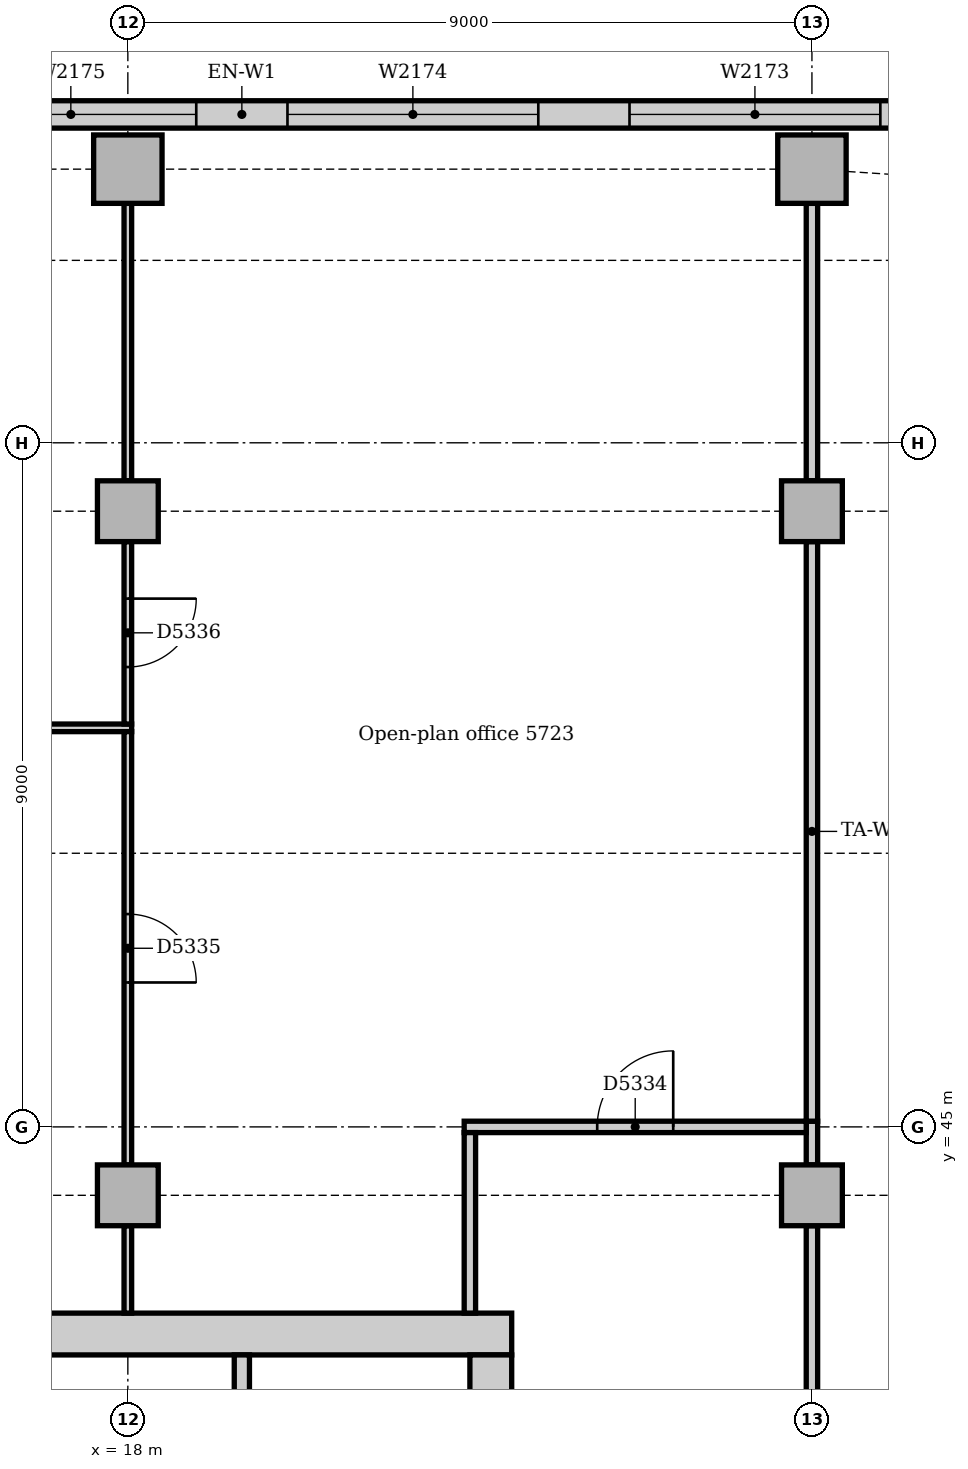
"""IFC4 building model, lengths in metres.
Left out: names, types, materials, properties, quantities, classifications, styles, units other than length and angle.
Written with IfcOpenShell. Run it as: python <this file> out.ifc"""

import sys

from ifc_helpers import new_model, si_unit, direction, frame, frame_2d, origin, origin_2d, place, context, subcontext, project, spatial, rectangle, extrude, element, fill, save


model = new_model("IFC4")
c1 = context("Model", 3, precision=1e-05, world=origin(), true_north=direction((0.0, 1.0)))
c2 = subcontext(c1, "Body", "Model", "MODEL_VIEW")
j1 = project(units=[si_unit("LENGTHUNIT", "METRE"), si_unit("PLANEANGLEUNIT", "RADIAN")], contexts=[c1])
p1 = place(None, origin())
s1 = spatial("IfcSite", under=j1, at=p1, CompositionType="ELEMENT")
p2 = place(p1, origin())
s2 = spatial("IfcBuilding", under=s1, at=p2, CompositionType="ELEMENT")
p3 = place(p2, frame((0.0, 0.0, 238.0)))
s3 = spatial("IfcBuildingStorey", under=s2, at=p3, CompositionType="ELEMENT", Elevation=238.0)
p4 = place(p3, frame((23.05, 42.275, 0.0), z_axis=(0.0, 0.0, 1.0), x_axis=(-1.0, 0.0, 0.0)))
e1 = element("IfcWall", 1, at=p4, inside=s3, PredefinedType="SOLIDWALL", context=c2, shape_type="SweptSolid", body=[
    extrude(rectangle(XDim=19.1, YDim=0.55, at=frame_2d((9.55, 0.0))), origin(), (0.0, 0.0, 1.0), 4.0),
])
p5 = place(p3, frame((22.775, 31.5, 0.0), z_axis=(0.0, 0.0, 1.0), x_axis=(0.0, 1.0, 0.0)))
e2 = element("IfcWall", 2, at=p5, inside=s3, PredefinedType="SOLIDWALL", context=c2, shape_type="SweptSolid", body=[
    extrude(rectangle(XDim=10.5, YDim=0.55, at=frame_2d((5.25, 0.0))), origin(), (0.0, 0.0, 1.0), 4.0),
])
p6 = place(p5, frame((3.15, 0.0, 0.0)))
e3 = element("IfcOpeningElement", 3, at=p6, cuts=e2, PredefinedType="OPENING", context=c2, shape_type="SweptSolid", body=[
    extrude(rectangle(XDim=1.0, YDim=2.1, at=frame_2d((0.5, 1.05))), frame((0.0, 0.285, 0.0), z_axis=(0.0, -1.0, 0.0), x_axis=(1.0, 0.0, 0.0)), (0.0, 0.0, 1.0), 0.57),
])
p7 = place(p5, frame((5.2, 0.0, 0.0)))
e4 = element("IfcOpeningElement", 4, at=p7, cuts=e2, PredefinedType="OPENING", context=c2, shape_type="SweptSolid", body=[
    extrude(rectangle(XDim=1.0, YDim=2.1, at=frame_2d((0.5, 1.05))), frame((0.0, 0.285, 0.0), z_axis=(0.0, -1.0, 0.0), x_axis=(1.0, 0.0, 0.0)), (0.0, 0.0, 1.0), 0.57),
])
for number, where, z_axis, x_axis in (
    (5, (18.0, 57.6, 0.0), (0.0, 0.0, 1.0), (1.0, 0.0, 0.0)),
    (6, (27.0, 57.6, 0.0), (0.0, 0.0, 1.0), (1.0, 0.0, 0.0)),
):
    element("IfcColumn", number, at=place(p3, frame(where, z_axis=z_axis, x_axis=x_axis)), inside=s3, PredefinedType="COLUMN", context=c2, shape_type="SweptSolid", body=[
        extrude(rectangle(XDim=0.9, YDim=0.9, at=origin_2d()), origin(), (0.0, 0.0, 1.0), 3.7),
    ])
for number, where, z_axis, x_axis in (
    (7, (18.0, 44.1, 0.0), (0.0, 0.0, 1.0), (1.0, 0.0, 0.0)),
    (8, (18.0, 53.1, 0.0), (0.0, 0.0, 1.0), (1.0, 0.0, 0.0)),
    (9, (27.0, 44.1, 0.0), (0.0, 0.0, 1.0), (1.0, 0.0, 0.0)),
    (10, (27.0, 53.1, 0.0), (0.0, 0.0, 1.0), (1.0, 0.0, 0.0)),
):
    element("IfcColumn", number, at=place(p3, frame(where, z_axis=z_axis, x_axis=x_axis)), inside=s3, PredefinedType="COLUMN", context=c2, shape_type="SweptSolid", body=[
        extrude(rectangle(XDim=0.8, YDim=0.8, at=origin_2d()), origin(), (0.0, 0.0, 1.0), 3.7),
    ])
p8 = place(p3, frame((34.757, 58.32, 0.0), z_axis=(0.0, 0.0, 1.0), x_axis=(-1.0, 0.0, 0.0)))
e11 = element("IfcWall", 11, at=p8, inside=s3, PredefinedType="STANDARD", context=c2, shape_type="SweptSolid", body=[
    extrude(rectangle(XDim=30.515, YDim=0.36, at=frame_2d((15.257, 0.0))), origin(), (0.0, 0.0, 1.0), 3.7),
])
p9 = place(p8, frame((2.357, 0.0, 0.9)))
e12 = element("IfcOpeningElement", 12, at=p9, cuts=e11, PredefinedType="OPENING", context=c2, shape_type="SweptSolid", body=[
    extrude(rectangle(XDim=3.3, YDim=1.6, at=frame_2d((1.65, 0.8))), frame((0.0, 0.19, 0.0), z_axis=(0.0, -1.0, 0.0), x_axis=(1.0, 0.0, 0.0)), (0.0, 0.0, 1.0), 0.38),
])
p10 = place(p8, frame((6.857, 0.0, 0.9)))
e13 = element("IfcOpeningElement", 13, at=p10, cuts=e11, PredefinedType="OPENING", context=c2, shape_type="SweptSolid", body=[
    extrude(rectangle(XDim=3.3, YDim=1.6, at=frame_2d((1.65, 0.8))), frame((0.0, 0.19, 0.0), z_axis=(0.0, -1.0, 0.0), x_axis=(1.0, 0.0, 0.0)), (0.0, 0.0, 1.0), 0.38),
])
p11 = place(p8, frame((11.357, 0.0, 0.9)))
e14 = element("IfcOpeningElement", 14, at=p11, cuts=e11, PredefinedType="OPENING", context=c2, shape_type="SweptSolid", body=[
    extrude(rectangle(XDim=3.3, YDim=1.6, at=frame_2d((1.65, 0.8))), frame((0.0, 0.19, 0.0), z_axis=(0.0, -1.0, 0.0), x_axis=(1.0, 0.0, 0.0)), (0.0, 0.0, 1.0), 0.38),
])
p12 = place(p8, frame((15.857, 0.0, 0.9)))
e15 = element("IfcOpeningElement", 15, at=p12, cuts=e11, PredefinedType="OPENING", context=c2, shape_type="SweptSolid", body=[
    extrude(rectangle(XDim=3.3, YDim=1.6, at=frame_2d((1.65, 0.8))), frame((0.0, 0.19, 0.0), z_axis=(0.0, -1.0, 0.0), x_axis=(1.0, 0.0, 0.0)), (0.0, 0.0, 1.0), 0.38),
])
p13 = place(p8, frame((20.357, 0.0, 0.9)))
e16 = element("IfcOpeningElement", 16, at=p13, cuts=e11, PredefinedType="OPENING", context=c2, shape_type="SweptSolid", body=[
    extrude(rectangle(XDim=3.3, YDim=1.6, at=frame_2d((1.65, 0.8))), frame((0.0, 0.19, 0.0), z_axis=(0.0, -1.0, 0.0), x_axis=(1.0, 0.0, 0.0)), (0.0, 0.0, 1.0), 0.38),
])
p14 = place(p8, frame((24.857, 0.0, 0.9)))
e17 = element("IfcOpeningElement", 17, at=p14, cuts=e11, PredefinedType="OPENING", context=c2, shape_type="SweptSolid", body=[
    extrude(rectangle(XDim=3.3, YDim=1.6, at=frame_2d((1.65, 0.8))), frame((0.0, 0.19, 0.0), z_axis=(0.0, -1.0, 0.0), x_axis=(1.0, 0.0, 0.0)), (0.0, 0.0, 1.0), 0.38),
])
p15 = place(p3, frame((19.5, 38.6, 0.0), z_axis=(0.0, 0.0, 1.0), x_axis=(0.0, 1.0, 0.0)))
e18 = element("IfcWall", 18, at=p15, inside=s3, PredefinedType="PARTITIONING", context=c2, shape_type="SweptSolid", body=[
    extrude(rectangle(XDim=3.4, YDim=0.2, at=frame_2d((1.7, 0.0))), origin(), (0.0, 0.0, 1.0), 3.7),
])
p16 = place(p3, frame((27.0, 36.4, 0.0), z_axis=(0.0, 0.0, 1.0), x_axis=(0.0, 1.0, 0.0)))
e19 = element("IfcWall", 19, at=p16, inside=s3, PredefinedType="PARTITIONING", context=c2, shape_type="SweptSolid", body=[
    extrude(rectangle(XDim=7.3, YDim=0.15, at=frame_2d((3.65, 0.0))), origin(), (0.0, 0.0, 1.0), 3.2),
])
p17 = place(p3, frame((27.0, 44.5, 0.0), z_axis=(0.0, 0.0, 1.0), x_axis=(0.0, 1.0, 0.0)))
e20 = element("IfcWall", 20, at=p17, inside=s3, PredefinedType="PARTITIONING", context=c2, shape_type="SweptSolid", body=[
    extrude(rectangle(XDim=0.575, YDim=0.15, at=frame_2d((0.287, 0.0))), origin(), (0.0, 0.0, 1.0), 3.2),
])
p18 = place(p3, frame((22.425, 45.0, 0.0), z_axis=(0.0, 0.0, 1.0), x_axis=(1.0, 0.0, 0.0)))
e21 = element("IfcWall", 21, at=p18, inside=s3, PredefinedType="PARTITIONING", context=c2, shape_type="SweptSolid", body=[
    extrude(rectangle(XDim=4.5, YDim=0.15, at=frame_2d((2.25, 0.0))), origin(), (0.0, 0.0, 1.0), 3.7),
])
p19 = place(p18, frame((1.75, 0.0, 0.0)))
e22 = element("IfcOpeningElement", 22, at=p19, cuts=e21, PredefinedType="OPENING", context=c2, shape_type="SweptSolid", body=[
    extrude(rectangle(XDim=1.0, YDim=2.1, at=frame_2d((0.5, 1.05))), frame((0.0, 0.085, 0.0), z_axis=(0.0, -1.0, 0.0), x_axis=(1.0, 0.0, 0.0)), (0.0, 0.0, 1.0), 0.17),
])
p20 = place(p3, frame((22.5, 42.55, 0.0), z_axis=(0.0, 0.0, 1.0), x_axis=(0.0, 1.0, 0.0)))
e23 = element("IfcWall", 23, at=p20, inside=s3, PredefinedType="PARTITIONING", context=c2, shape_type="SweptSolid", body=[
    extrude(rectangle(XDim=2.375, YDim=0.15, at=frame_2d((1.188, 0.0))), origin(), (0.0, 0.0, 1.0), 3.7),
])
p21 = place(p3, frame((27.0, 45.075, 0.0), z_axis=(0.0, 0.0, 1.0), x_axis=(0.0, 1.0, 0.0)))
e24 = element("IfcWall", 24, at=p21, inside=s3, PredefinedType="PARTITIONING", context=c2, shape_type="SweptSolid", body=[
    extrude(rectangle(XDim=7.625, YDim=0.15, at=frame_2d((3.812, 0.0))), origin(), (0.0, 0.0, 1.0), 3.2),
])
p22 = place(p3, frame((27.0, 53.5, 0.0), z_axis=(0.0, 0.0, 1.0), x_axis=(0.0, 1.0, 0.0)))
e25 = element("IfcWall", 25, at=p22, inside=s3, PredefinedType="PARTITIONING", context=c2, shape_type="SweptSolid", body=[
    extrude(rectangle(XDim=3.65, YDim=0.15, at=frame_2d((1.825, 0.0))), origin(), (0.0, 0.0, 1.0), 3.26),
])
p23 = place(p3, frame((0.36, 50.25, 0.0), z_axis=(0.0, 0.0, 1.0), x_axis=(1.0, 0.0, 0.0)))
e26 = element("IfcWall", 26, at=p23, inside=s3, PredefinedType="PARTITIONING", context=c2, shape_type="SweptSolid", body=[
    extrude(rectangle(XDim=17.69, YDim=0.1, at=frame_2d((8.845, 0.0))), origin(), (0.0, 0.0, 1.0), 3.7),
])
p24 = place(p3, frame((18.0, 42.55, 0.0), z_axis=(0.0, 0.0, 1.0), x_axis=(0.0, 1.0, 0.0)))
e27 = element("IfcWall", 27, at=p24, inside=s3, PredefinedType="PARTITIONING", context=c2, shape_type="SweptSolid", body=[
    extrude(rectangle(XDim=1.15, YDim=0.1, at=frame_2d((0.575, 0.0))), origin(), (0.0, 0.0, 1.0), 3.502),
])
p25 = place(p3, frame((18.0, 50.3, 0.0), z_axis=(0.0, 0.0, 1.0), x_axis=(0.0, 1.0, 0.0)))
e28 = element("IfcWall", 28, at=p25, inside=s3, PredefinedType="PARTITIONING", context=c2, shape_type="SweptSolid", body=[
    extrude(rectangle(XDim=2.4, YDim=0.1, at=frame_2d((1.2, 0.0))), origin(), (0.0, 0.0, 1.0), 3.2),
])
p26 = place(p25, frame((0.75, 0.0, 0.0)))
e29 = element("IfcOpeningElement", 29, at=p26, cuts=e28, PredefinedType="OPENING", context=c2, shape_type="SweptSolid", body=[
    extrude(rectangle(XDim=0.9, YDim=2.1, at=frame_2d((0.45, 1.05))), frame((0.0, 0.06, 0.0), z_axis=(0.0, -1.0, 0.0), x_axis=(1.0, 0.0, 0.0)), (0.0, 0.0, 1.0), 0.12),
])
p27 = place(p3, frame((18.0, 44.5, 0.0), z_axis=(0.0, 0.0, 1.0), x_axis=(0.0, 1.0, 0.0)))
e30 = element("IfcWall", 30, at=p27, inside=s3, PredefinedType="PARTITIONING", context=c2, shape_type="SweptSolid", body=[
    extrude(rectangle(XDim=5.7, YDim=0.1, at=frame_2d((2.85, 0.0))), origin(), (0.0, 0.0, 1.0), 3.2),
])
p28 = place(p27, frame((2.4, 0.0, 0.0)))
e31 = element("IfcOpeningElement", 31, at=p28, cuts=e30, PredefinedType="OPENING", context=c2, shape_type="SweptSolid", body=[
    extrude(rectangle(XDim=0.9, YDim=2.1, at=frame_2d((0.45, 1.05))), frame((0.0, 0.06, 0.0), z_axis=(0.0, -1.0, 0.0), x_axis=(1.0, 0.0, 0.0)), (0.0, 0.0, 1.0), 0.12),
])
p29 = place(p3, frame((18.0, 53.5, 0.0), z_axis=(0.0, 0.0, 1.0), x_axis=(0.0, 1.0, 0.0)))
e32 = element("IfcWall", 32, at=p29, inside=s3, PredefinedType="PARTITIONING", context=c2, shape_type="SweptSolid", body=[
    extrude(rectangle(XDim=3.65, YDim=0.1, at=frame_2d((1.825, 0.0))), origin(), (0.0, 0.0, 1.0), 3.26),
])
p30 = place(p10, origin())
e33 = element("IfcWindow", 33, at=p30, inside=s3, PartitioningType="SINGLE_PANEL", PredefinedType="WINDOW", context=c2, shape_type="SweptSolid", body=[
    extrude(rectangle(XDim=3.3, YDim=1.6, at=frame_2d((1.65, 0.8))), frame((0.0, 0.13, 0.0), z_axis=(0.0, -1.0, 0.0), x_axis=(1.0, 0.0, 0.0)), (0.0, 0.0, 1.0), 0.06),
])
fill(e13, e33)
p31 = place(p11, origin())
e34 = element("IfcWindow", 34, at=p31, inside=s3, PartitioningType="SINGLE_PANEL", PredefinedType="WINDOW", context=c2, shape_type="SweptSolid", body=[
    extrude(rectangle(XDim=3.3, YDim=1.6, at=frame_2d((1.65, 0.8))), frame((0.0, 0.13, 0.0), z_axis=(0.0, -1.0, 0.0), x_axis=(1.0, 0.0, 0.0)), (0.0, 0.0, 1.0), 0.06),
])
fill(e14, e34)
p32 = place(p12, origin())
e35 = element("IfcWindow", 35, at=p32, inside=s3, PartitioningType="SINGLE_PANEL", PredefinedType="WINDOW", context=c2, shape_type="SweptSolid", body=[
    extrude(rectangle(XDim=3.3, YDim=1.6, at=frame_2d((1.65, 0.8))), frame((0.0, 0.13, 0.0), z_axis=(0.0, -1.0, 0.0), x_axis=(1.0, 0.0, 0.0)), (0.0, 0.0, 1.0), 0.06),
])
fill(e15, e35)
p33 = place(p19, origin())
e36 = element("IfcDoor", 36, at=p33, inside=s3, OperationType="SINGLE_SWING_RIGHT", PredefinedType="DOOR", context=c2, shape_type="SweptSolid", body=[
    extrude(rectangle(XDim=1.0, YDim=2.1, at=frame_2d((0.5, 1.05))), frame((0.0, 0.025, 0.0), z_axis=(0.0, -1.0, 0.0), x_axis=(1.0, 0.0, 0.0)), (0.0, 0.0, 1.0), 0.05),
])
fill(e22, e36)
p34 = place(p28, frame((0.9, 0.0, 0.0), z_axis=(0.0, 0.0, 1.0), x_axis=(-1.0, 0.0, 0.0)))
e37 = element("IfcDoor", 37, at=p34, inside=s3, OperationType="SINGLE_SWING_RIGHT", PredefinedType="DOOR", context=c2, shape_type="SweptSolid", body=[
    extrude(rectangle(XDim=0.9, YDim=2.1, at=frame_2d((0.45, 1.05))), frame((0.0, 0.025, 0.0), z_axis=(0.0, -1.0, 0.0), x_axis=(1.0, 0.0, 0.0)), (0.0, 0.0, 1.0), 0.05),
])
fill(e31, e37)
p35 = place(p26, frame((0.9, 0.0, 0.0), z_axis=(0.0, 0.0, 1.0), x_axis=(-1.0, 0.0, 0.0)))
e38 = element("IfcDoor", 38, at=p35, inside=s3, OperationType="SINGLE_SWING_LEFT", PredefinedType="DOOR", context=c2, shape_type="SweptSolid", body=[
    extrude(rectangle(XDim=0.9, YDim=2.1, at=frame_2d((0.45, 1.05))), frame((0.0, 0.025, 0.0), z_axis=(0.0, -1.0, 0.0), x_axis=(1.0, 0.0, 0.0)), (0.0, 0.0, 1.0), 0.05),
])
fill(e29, e38)
save(model, sys.argv[1])
